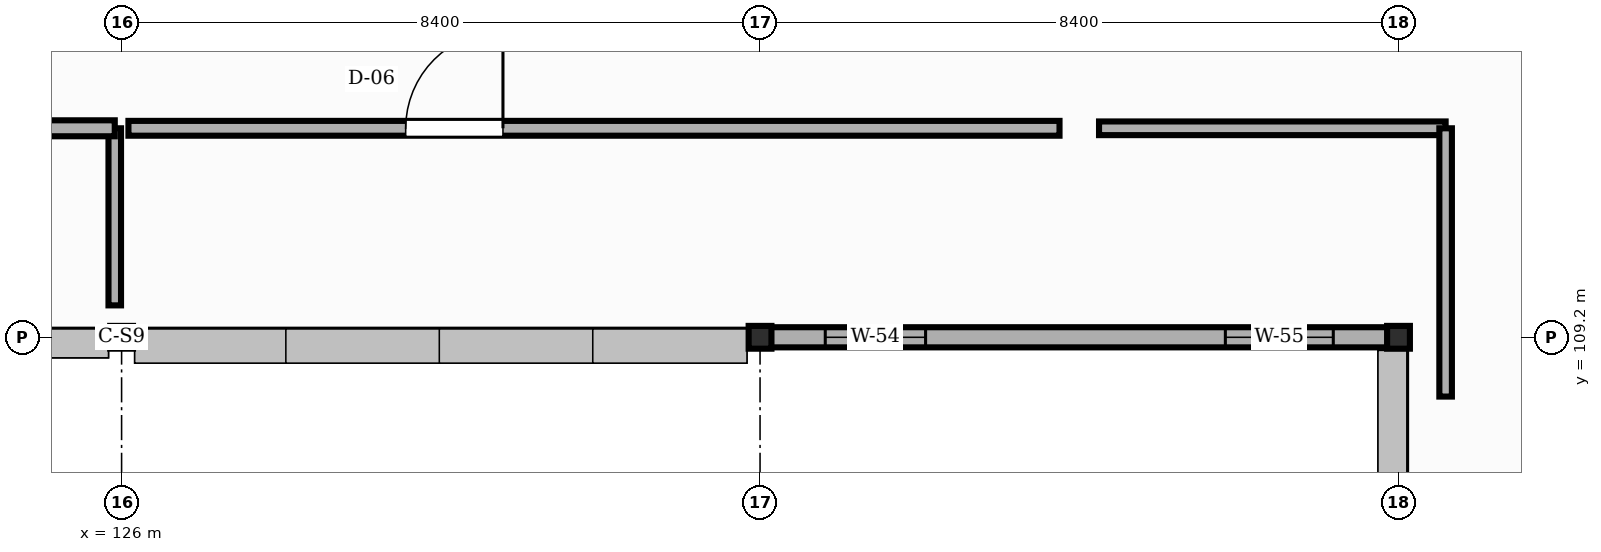
"""IFC4 building model, lengths in metres.
Left out: names, types, materials, properties, quantities, classifications, styles, units other than length and angle.
Written with IfcOpenShell. Run it as: python <this file> out.ifc"""

import sys

from ifc_helpers import new_model, si_unit, direction, frame, frame_2d, origin, origin_2d, place, context, subcontext, project, spatial, rectangle, i_section, extrude, element, fill, save


model = new_model("IFC4")
c1 = context("Model", 3, precision=1e-05, world=origin(), true_north=direction((0.0, 1.0)))
c2 = subcontext(c1, "Body", "Model", "MODEL_VIEW")
j1 = project(units=[si_unit("LENGTHUNIT", "METRE"), si_unit("PLANEANGLEUNIT", "RADIAN")], contexts=[c1])
p1 = place(None, origin())
s1 = spatial("IfcSite", under=j1, at=p1, CompositionType="ELEMENT")
p2 = place(p1, origin())
s2 = spatial("IfcBuilding", under=s1, at=p2, CompositionType="ELEMENT")
p3 = place(p2, frame((0.0, 0.0, 30.15)))
s3 = spatial("IfcBuildingStorey", under=s2, at=p3, CompositionType="ELEMENT", Elevation=30.15)
for number, where, z_axis, x_axis in (
    (1, (126.0, 109.2, 0.0), (0.0, 0.0, 1.0), (1.0, 0.0, 0.0)),
    (2, (134.4, 109.2, 0.0), (0.0, 0.0, 1.0), (1.0, 0.0, 0.0)),
    (3, (142.8, 109.2, 0.0), (0.0, 0.0, 1.0), (1.0, 0.0, 0.0)),
):
    element("IfcColumn", number, at=place(p3, frame(where, z_axis=z_axis, x_axis=x_axis)), inside=s3, PredefinedType="COLUMN", context=c2, shape_type="SweptSolid", body=[
        extrude(i_section(OverallWidth=0.3, OverallDepth=0.3, WebThickness=0.011, FlangeThickness=0.019, FilletRadius=0.027, at=origin_2d()), origin(), (0.0, 0.0, 1.0), 4.2),
    ])
p4 = place(p3, frame((134.408, 109.2, 0.0), z_axis=(0.0, 0.0, 1.0), x_axis=(1.0, 0.0, 0.0)))
e4 = element("IfcWall", 4, at=p4, inside=s3, PredefinedType="STANDARD", context=c2, shape_type="SweptSolid", body=[
    extrude(rectangle(XDim=8.384, YDim=0.265, at=frame_2d((4.192, 0.0))), origin(), (0.0, 0.0, 1.0), 3.692),
])
p5 = place(p4, frame((0.85, 0.0, 0.9)))
e5 = element("IfcOpeningElement", 5, at=p5, cuts=e4, PredefinedType="OPENING", context=c2, shape_type="SweptSolid", body=[
    extrude(rectangle(XDim=1.32, YDim=2.05, at=frame_2d((0.66, 1.025))), frame((0.0, 0.142, 0.0), z_axis=(0.0, -1.0, 0.0), x_axis=(1.0, 0.0, 0.0)), (0.0, 0.0, 1.0), 0.285),
])
p6 = place(p4, frame((6.114, 0.0, 0.9)))
e6 = element("IfcOpeningElement", 6, at=p6, cuts=e4, PredefinedType="OPENING", context=c2, shape_type="SweptSolid", body=[
    extrude(rectangle(XDim=1.42, YDim=2.05, at=frame_2d((0.71, 1.025))), frame((0.0, 0.142, 0.0), z_axis=(0.0, -1.0, 0.0), x_axis=(1.0, 0.0, 0.0)), (0.0, 0.0, 1.0), 0.285),
])
p7 = place(p3, frame((125.91, 111.95, -0.004), z_axis=(0.0, 0.0, 1.0), x_axis=(0.0, -1.0, 0.0)))
e7 = element("IfcWall", 7, at=p7, inside=s3, PredefinedType="STANDARD", context=c2, shape_type="SweptSolid", body=[
    extrude(rectangle(XDim=2.33, YDim=0.165, at=frame_2d((1.165, 0.0))), origin(), (0.0, 0.0, 1.0), 3.666),
])
p8 = place(p3, frame((113.49, 111.95, -0.004), z_axis=(0.0, 0.0, 1.0), x_axis=(1.0, 0.0, 0.0)))
e8 = element("IfcWall", 8, at=p8, inside=s3, PredefinedType="STANDARD", context=c2, shape_type="SweptSolid", body=[
    extrude(rectangle(XDim=12.42, YDim=0.21, at=frame_2d((6.21, 0.0))), origin(), (0.0, 0.0, 1.0), 4.004),
])
p9 = place(p8, frame((7.483, 0.0, 0.0)))
e9 = element("IfcOpeningElement", 9, at=p9, cuts=e8, PredefinedType="OPENING", context=c2, shape_type="SweptSolid", body=[
    extrude(rectangle(XDim=1.18, YDim=2.06, at=frame_2d((0.59, 1.03))), frame((0.0, 0.115, 0.0), z_axis=(0.0, -1.0, 0.0), x_axis=(1.0, 0.0, 0.0)), (0.0, 0.0, 1.0), 0.23),
])
p10 = place(p3, frame((126.09, 111.95, -0.004), z_axis=(0.0, 0.0, 1.0), x_axis=(1.0, 0.0, 0.0)))
e10 = element("IfcWall", 10, at=p10, inside=s3, PredefinedType="STANDARD", context=c2, shape_type="SweptSolid", body=[
    extrude(rectangle(XDim=12.25, YDim=0.195, at=frame_2d((6.125, 0.0))), origin(), (0.0, 0.0, 1.0), 4.004),
])
p11 = place(p10, frame((3.647, 0.0, 0.0)))
e11 = element("IfcOpeningElement", 11, at=p11, cuts=e10, PredefinedType="OPENING", context=c2, shape_type="SweptSolid", body=[
    extrude(rectangle(XDim=1.28, YDim=2.06, at=frame_2d((0.64, 1.03))), frame((0.0, 0.107, 0.0), z_axis=(0.0, -1.0, 0.0), x_axis=(1.0, 0.0, 0.0)), (0.0, 0.0, 1.0), 0.215),
])
p12 = place(p3, frame((138.86, 111.95, -0.004), z_axis=(0.0, 0.0, 1.0), x_axis=(1.0, 0.0, 0.0)))
e12 = element("IfcWall", 12, at=p12, inside=s3, PredefinedType="STANDARD", context=c2, shape_type="SweptSolid", body=[
    extrude(rectangle(XDim=4.56, YDim=0.18, at=frame_2d((2.28, 0.0))), origin(), (0.0, 0.0, 1.0), 4.004),
])
p13 = place(p3, frame((143.42, 111.95, -0.004), z_axis=(0.0, 0.0, 1.0), x_axis=(0.0, -1.0, 0.0)))
e13 = element("IfcWall", 13, at=p13, inside=s3, PredefinedType="STANDARD", context=c2, shape_type="SweptSolid", body=[
    extrude(rectangle(XDim=3.53, YDim=0.165, at=frame_2d((1.765, 0.0))), origin(), (0.0, 0.0, 1.0), 4.004),
])
p14 = place(p5, origin())
e14 = element("IfcWindow", 14, at=p14, inside=s3, PartitioningType="SINGLE_PANEL", PredefinedType="WINDOW", context=c2, shape_type="SweptSolid", body=[
    extrude(rectangle(XDim=1.32, YDim=2.05, at=frame_2d((0.66, 1.025))), frame((0.0, 0.03, 0.0), z_axis=(0.0, -1.0, 0.0), x_axis=(1.0, 0.0, 0.0)), (0.0, 0.0, 1.0), 0.06),
])
fill(e5, e14)
p15 = place(p6, origin())
e15 = element("IfcWindow", 15, at=p15, inside=s3, PartitioningType="SINGLE_PANEL", PredefinedType="WINDOW", context=c2, shape_type="SweptSolid", body=[
    extrude(rectangle(XDim=1.42, YDim=2.05, at=frame_2d((0.71, 1.025))), frame((0.0, 0.03, 0.0), z_axis=(0.0, -1.0, 0.0), x_axis=(1.0, 0.0, 0.0)), (0.0, 0.0, 1.0), 0.06),
])
fill(e6, e15)
p16 = place(p11, origin())
e16 = element("IfcDoor", 16, at=p16, inside=s3, OperationType="SINGLE_SWING_RIGHT", PredefinedType="DOOR", context=c2, shape_type="SweptSolid", body=[
    extrude(rectangle(XDim=1.28, YDim=2.06, at=frame_2d((0.64, 1.03))), frame((0.0, 0.025, 0.0), z_axis=(0.0, -1.0, 0.0), x_axis=(1.0, 0.0, 0.0)), (0.0, 0.0, 1.0), 0.05),
])
fill(e11, e16)
save(model, sys.argv[1])
